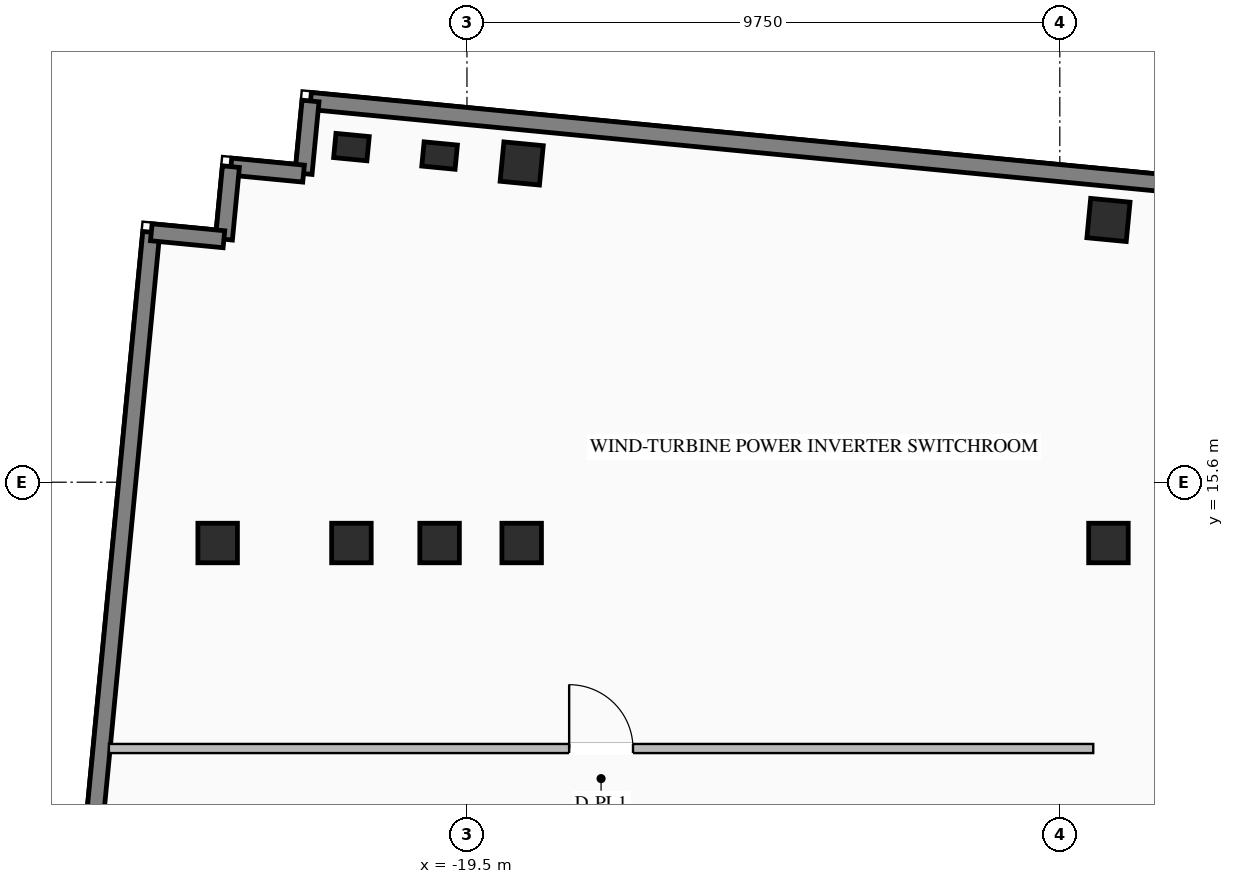
"""IFC4 building model, lengths in metres.
Left out: names, types, materials, properties, quantities, classifications, styles, units other than length and angle.
Written with IfcOpenShell. Run it as: python <this file> out.ifc"""

import sys

from ifc_helpers import new_model, si_unit, direction, frame, frame_2d, origin, origin_2d, place, context, subcontext, project, spatial, rectangle, i_section, extrude, element, fill, save


model = new_model("IFC4")
c1 = context("Model", 3, precision=1e-05, world=origin(), true_north=direction((0.0, 1.0)))
c2 = subcontext(c1, "Body", "Model", "MODEL_VIEW")
j1 = project(units=[si_unit("LENGTHUNIT", "METRE"), si_unit("PLANEANGLEUNIT", "RADIAN")], contexts=[c1])
p1 = place(None, origin())
s1 = spatial("IfcSite", under=j1, at=p1, CompositionType="ELEMENT")
p2 = place(p1, origin())
s2 = spatial("IfcBuilding", under=s1, at=p2, CompositionType="ELEMENT")
p3 = place(p2, frame((0.0, 0.0, 199.5)))
s3 = spatial("IfcBuildingStorey", under=s2, at=p3, CompositionType="ELEMENT", Elevation=199.5)
for number, where, z_axis, x_axis in (
    (1, (-21.4, 14.6, 0.0), (0.0, 0.0, 1.0), (1.0, 0.0, 0.0)),
    (2, (-19.95, 14.6, 0.0), (0.0, 0.0, 1.0), (1.0, 0.0, 0.0)),
    (3, (-18.6, 14.6, 0.0), (0.0, 0.0, 1.0), (1.0, 0.0, 0.0)),
    (4, (-8.95, 14.6, 0.0), (0.0, 0.0, 1.0), (1.0, 0.0, 0.0)),
    (5, (-23.6, 14.6, 0.0), (0.0, 0.0, 1.0), (1.0, 0.0, 0.0)),
    (6, (-18.6, 20.842, 0.0), (0.0, 0.0, 1.0), (0.995, -0.096, 0.0)),
    (7, (-8.95, 19.913, 0.0), (0.0, 0.0, 1.0), (0.995, -0.096, 0.0)),
):
    element("IfcColumn", number, at=place(p3, frame(where, z_axis=z_axis, x_axis=x_axis)), inside=s3, PredefinedType="COLUMN", context=c2, shape_type="SweptSolid", body=[
        extrude(i_section(OverallWidth=0.65, OverallDepth=0.65, WebThickness=0.028, FlangeThickness=0.04, at=origin_2d()), origin(), (0.0, 0.0, 1.0), 4.8),
    ])
for number, where, z_axis, x_axis in (
    (8, (-21.4, 21.112, 0.0), (0.0, 0.0, 1.0), (0.995, -0.096, 0.0)),
    (9, (-19.95, 20.972, 0.0), (0.0, 0.0, 1.0), (0.995, -0.096, 0.0)),
):
    element("IfcColumn", number, at=place(p3, frame(where, z_axis=z_axis, x_axis=x_axis)), inside=s3, PredefinedType="PILASTER", context=c2, shape_type="SweptSolid", body=[
        extrude(rectangle(XDim=0.55, YDim=0.4, at=origin_2d()), origin(), (0.0, 0.0, 1.0), 4.8),
    ])
p4 = place(p3, frame((-22.073, 21.87, 0.0), z_axis=(0.0, 0.0, 1.0), x_axis=(0.995395606285, -0.095851901334, 0.0)))
e10 = element("IfcWall", 10, at=p4, inside=s3, PredefinedType="STANDARD", context=c2, shape_type="SweptSolid", body=[
    extrude(rectangle(XDim=14.34, YDim=0.28, at=frame_2d((7.17, 0.0))), origin(), (0.0, 0.0, 1.0), 4.5),
])
p5 = place(p3, frame((-26.301, 2.998, 0.0), z_axis=(0.0, 0.0, 1.0), x_axis=(0.095837640115, 0.99539697947, 0.0)))
e11 = element("IfcWall", 11, at=p5, inside=s3, PredefinedType="STANDARD", context=c2, shape_type="SweptSolid", body=[
    extrude(rectangle(XDim=16.79, YDim=0.28, at=frame_2d((8.395, 0.0))), origin(), (0.0, 0.0, 1.0), 4.5),
])
for number, where, z_axis, x_axis in (
    (12, (-22.073, 21.87, 0.0), (0.0, 0.0, 1.0), (-0.096, -0.995, 0.0)),
    (13, (-22.188, 20.676, 0.0), (0.0, 0.0, 1.0), (-0.995, 0.096, 0.0)),
    (14, (-23.382, 20.791, 0.0), (0.0, 0.0, 1.0), (-0.096, -0.995, 0.0)),
    (15, (-23.497, 19.596, 0.0), (0.0, 0.0, 1.0), (-0.995, 0.096, 0.0)),
):
    element("IfcWall", number, at=place(p3, frame(where, z_axis=z_axis, x_axis=x_axis)), inside=s3, PredefinedType="STANDARD", context=c2, shape_type="SweptSolid", body=[
        extrude(rectangle(XDim=1.2, YDim=0.28, at=frame_2d((0.6, 0.0))), origin(), (0.0, 0.0, 1.0), 4.5),
    ])
p6 = place(p3, frame((-25.389, 11.22, 0.0), z_axis=(0.0, 0.0, 1.0), x_axis=(1.0, 0.0, 0.0)))
e16 = element("IfcWall", 16, at=p6, inside=s3, PredefinedType="STANDARD", context=c2, shape_type="SweptSolid", body=[
    extrude(rectangle(XDim=16.189, YDim=0.15, at=frame_2d((8.094, 0.0))), origin(), (0.0, 0.0, 1.0), 4.5),
])
p7 = place(p6, frame((7.569, 0.0, 0.0)))
e17 = element("IfcOpeningElement", 17, at=p7, cuts=e16, PredefinedType="OPENING", context=c2, shape_type="SweptSolid", body=[
    extrude(rectangle(XDim=1.05, YDim=2.08, at=frame_2d((0.525, 1.04))), frame((0.0, 0.085, 0.0), z_axis=(0.0, -1.0, 0.0), x_axis=(1.0, 0.0, 0.0)), (0.0, 0.0, 1.0), 0.17),
])
p8 = place(p7, origin())
e18 = element("IfcDoor", 18, at=p8, inside=s3, OperationType="SINGLE_SWING_LEFT", PredefinedType="DOOR", context=c2, shape_type="SweptSolid", body=[
    extrude(rectangle(XDim=1.05, YDim=2.08, at=frame_2d((0.525, 1.04))), frame((0.0, 0.025, 0.0), z_axis=(0.0, -1.0, 0.0), x_axis=(1.0, 0.0, 0.0)), (0.0, 0.0, 1.0), 0.05),
])
fill(e17, e18)
save(model, sys.argv[1])
